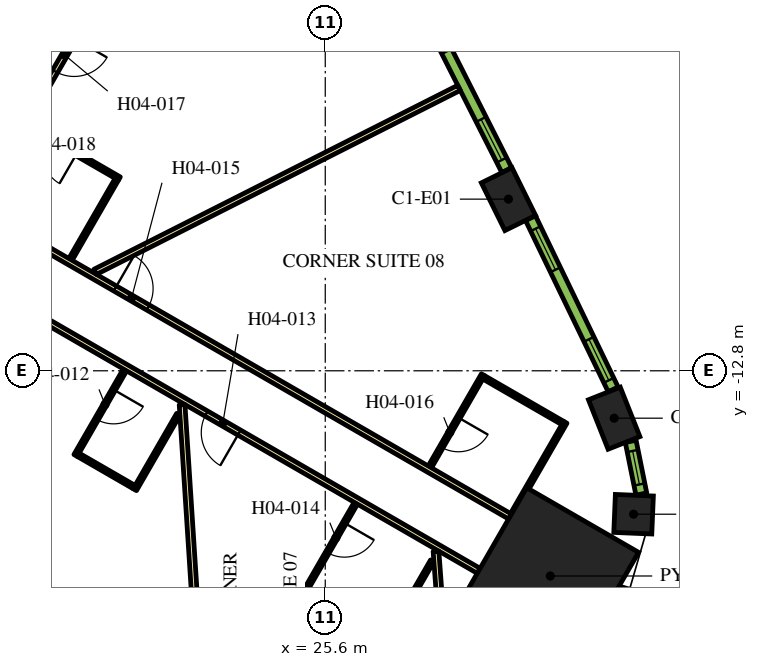
"""IFC4 building model, lengths in metres.
Left out: names, types, materials, properties, quantities, classifications, styles, units other than length and angle.
Written with IfcOpenShell. Run it as: python <this file> out.ifc"""

import sys

from ifc_helpers import new_model, si_unit, direction, frame, frame_2d, origin, origin_2d, place, context, subcontext, project, spatial, rectangle, extrude, element, fill, save


model = new_model("IFC4")
c1 = context("Model", 3, precision=1e-05, world=origin(), true_north=direction((0.0, 1.0)))
c2 = subcontext(c1, "Body", "Model", "MODEL_VIEW")
j1 = project(units=[si_unit("LENGTHUNIT", "METRE"), si_unit("PLANEANGLEUNIT", "RADIAN")], contexts=[c1])
p1 = place(None, origin())
s1 = spatial("IfcSite", under=j1, at=p1, CompositionType="ELEMENT")
p2 = place(p1, origin())
s2 = spatial("IfcBuilding", under=s1, at=p2, CompositionType="ELEMENT")
p3 = place(p2, frame((0.0, 0.0, 70.5)))
s3 = spatial("IfcBuildingStorey", under=s2, at=p3, CompositionType="ELEMENT", Elevation=70.5)
p4 = place(p3, frame((31.522, -18.199, 0.0), z_axis=(0.0, 0.0, 1.0), x_axis=(0.866025403784, -0.5, 0.0)))
e1 = element("IfcColumn", 1, at=p4, inside=s3, PredefinedType="COLUMN", context=c2, shape_type="SweptSolid", body=[
    extrude(rectangle(XDim=3.4, YDim=3.4, at=origin_2d()), origin(), (0.0, 0.0, 1.0), 3.9),
])
p5 = place(p3, frame((33.713, -16.574, 0.0), z_axis=(0.0, 0.0, 1.0), x_axis=(0.041582693819, 0.999135065732, 0.0)))
e2 = element("IfcColumn", 2, at=p5, inside=s3, PredefinedType="COLUMN", context=c2, shape_type="SweptSolid", body=[
    extrude(rectangle(XDim=1.0, YDim=1.0, at=origin_2d()), origin(), (0.0, 0.0, 1.0), 3.9),
])
for number, where, z_axis, x_axis in (
    (3, (33.203, -14.047, 0.0), (0.0, 0.0, 1.0), (-0.369, 0.929, 0.0)),
    (4, (30.421, -8.284, 0.0), (0.0, 0.0, 1.0), (-0.443, 0.897, 0.0)),
):
    element("IfcColumn", number, at=place(p3, frame(where, z_axis=z_axis, x_axis=x_axis)), inside=s3, PredefinedType="COLUMN", context=c2, shape_type="SweptSolid", body=[
        extrude(rectangle(XDim=1.4, YDim=0.9, at=origin_2d()), origin(), (0.0, 0.0, 1.0), 3.9),
    ])
p6 = place(p3, frame((16.412, -8.523, 0.0), z_axis=(0.0, 0.0, 1.0), x_axis=(0.866022197818, -0.500005552856, 0.0)))
e5 = element("IfcWall", 5, at=p6, inside=s3, PredefinedType="PARTITIONING", context=c2, shape_type="SweptSolid", body=[
    extrude(rectangle(XDim=16.224, YDim=0.15, at=frame_2d((8.112, 0.0))), origin(), (0.0, 0.0, 1.0), 2.75),
])
p7 = place(p6, frame((4.223, 0.0, 0.0)))
e6 = element("IfcOpeningElement", 6, at=p7, cuts=e5, PredefinedType="OPENING", context=c2, shape_type="SweptSolid", body=[
    extrude(rectangle(XDim=1.0, YDim=2.1, at=frame_2d((0.5, 1.05))), frame((0.0, 0.085, 0.0), z_axis=(0.0, -1.0, 0.0), x_axis=(1.0, 0.0, 0.0)), (0.0, 0.0, 1.0), 0.17),
])
p8 = place(p3, frame((19.081, -3.9, 0.0), z_axis=(0.0, 0.0, 1.0), x_axis=(-0.499974327079, -0.866040225545, 0.0)))
e7 = element("IfcWall", 7, at=p8, inside=s3, PredefinedType="PARTITIONING", context=c2, shape_type="SweptSolid", body=[
    extrude(rectangle(XDim=5.258, YDim=0.15, at=frame_2d((2.629, 0.0))), origin(), (0.0, 0.0, 1.0), 2.75),
])
p9 = place(p8, frame((0.18, 0.0, 0.0)))
e8 = element("IfcOpeningElement", 8, at=p9, cuts=e7, PredefinedType="OPENING", context=c2, shape_type="SweptSolid", body=[
    extrude(rectangle(XDim=1.0, YDim=2.1, at=frame_2d((0.5, 1.05))), frame((0.0, 0.085, 0.0), z_axis=(0.0, -1.0, 0.0), x_axis=(1.0, 0.0, 0.0)), (0.0, 0.0, 1.0), 0.17),
])
p10 = place(p3, frame((29.638, -18.064, 0.0), z_axis=(0.0, 0.0, 1.0), x_axis=(-0.866026175601, 0.499998663172, 0.0)))
e9 = element("IfcWall", 9, at=p10, inside=s3, PredefinedType="PARTITIONING", context=c2, shape_type="SweptSolid", body=[
    extrude(rectangle(XDim=16.144, YDim=0.15, at=frame_2d((8.072, 0.0))), origin(), (0.0, 0.0, 1.0), 2.75),
])
p11 = place(p10, frame((14.714, 0.0, 0.0)))
e10 = element("IfcOpeningElement", 10, at=p11, cuts=e9, PredefinedType="OPENING", context=c2, shape_type="SweptSolid", body=[
    extrude(rectangle(XDim=1.0, YDim=2.1, at=frame_2d((0.5, 1.05))), frame((0.0, 0.085, 0.0), z_axis=(0.0, -1.0, 0.0), x_axis=(1.0, 0.0, 0.0)), (0.0, 0.0, 1.0), 0.17),
])
p12 = place(p10, frame((7.275, 0.0, 0.0)))
e11 = element("IfcOpeningElement", 11, at=p12, cuts=e9, PredefinedType="OPENING", context=c2, shape_type="SweptSolid", body=[
    extrude(rectangle(XDim=1.0, YDim=2.1, at=frame_2d((0.5, 1.05))), frame((0.0, 0.085, 0.0), z_axis=(0.0, -1.0, 0.0), x_axis=(1.0, 0.0, 0.0)), (0.0, 0.0, 1.0), 0.17),
])
p13 = place(p3, frame((29.12, -5.356, 0.0), z_axis=(0.0, 0.0, 1.0), x_axis=(-0.892401965553, -0.451241323327, 0.0)))
e12 = element("IfcWall", 12, at=p13, inside=s3, PredefinedType="PARTITIONING", context=c2, shape_type="SweptSolid", body=[
    extrude(rectangle(XDim=10.729, YDim=0.15, at=frame_2d((5.364, 0.0))), origin(), (0.0, 0.0, 1.0), 2.75),
])
p14 = place(p3, frame((22.355, -21.754, 0.0), z_axis=(0.0, 0.0, 1.0), x_axis=(-0.064639533143, 0.997908678565, 0.0)))
e13 = element("IfcWall", 13, at=p14, inside=s3, PredefinedType="PARTITIONING", context=c2, shape_type="SweptSolid", body=[
    extrude(rectangle(XDim=8.079, YDim=0.15, at=frame_2d((4.04, 0.0))), origin(), (0.0, 0.0, 1.0), 2.75),
])
p15 = place(p3, frame((28.79, -21.273, 0.0), z_axis=(0.0, 0.0, 1.0), x_axis=(-0.07382592098, 0.997271143366, 0.0)))
e14 = element("IfcWall", 14, at=p15, inside=s3, PredefinedType="PARTITIONING", context=c2, shape_type="SweptSolid", body=[
    extrude(rectangle(XDim=3.734, YDim=0.15, at=frame_2d((1.867, 0.0))), origin(), (0.0, 0.0, 1.0), 2.75),
])
p16 = place(p3, frame((20.33, -12.777, 0.0), z_axis=(0.0, 0.0, 1.0), x_axis=(-0.500006934395, -0.866021400173, 0.0)))
e15 = element("IfcWall", 15, at=p16, inside=s3, PredefinedType="PARTITIONING", context=c2, shape_type="SweptSolid", body=[
    extrude(rectangle(XDim=2.6, YDim=0.1, at=frame_2d((1.3, 0.0))), origin(), (0.0, 0.0, 1.0), 2.75),
])
p17 = place(p16, frame((0.6, 0.0, 0.0)))
e16 = element("IfcOpeningElement", 16, at=p17, cuts=e15, PredefinedType="OPENING", context=c2, shape_type="SweptSolid", body=[
    extrude(rectangle(XDim=0.9, YDim=2.1, at=frame_2d((0.45, 1.05))), frame((0.0, 0.06, 0.0), z_axis=(0.0, -1.0, 0.0), x_axis=(1.0, 0.0, 0.0)), (0.0, 0.0, 1.0), 0.12),
])
p18 = place(p3, frame((19.098, -15.01, 0.0), z_axis=(0.0, 0.0, 1.0), x_axis=(0.86605165483, -0.499954529098, 0.0)))
e17 = element("IfcWall", 17, at=p18, inside=s3, PredefinedType="PARTITIONING", context=c2, shape_type="SweptSolid", body=[
    extrude(rectangle(XDim=1.7, YDim=0.1, at=frame_2d((0.85, 0.0))), origin(), (0.0, 0.0, 1.0), 2.75),
])
p19 = place(p3, frame((21.734, -13.945, 0.0), z_axis=(0.0, 0.0, 1.0), x_axis=(-0.500014693593, -0.866016920268, 0.0)))
e18 = element("IfcWall", 18, at=p19, inside=s3, PredefinedType="PARTITIONING", context=c2, shape_type="SweptSolid", body=[
    extrude(rectangle(XDim=2.29, YDim=0.1, at=frame_2d((1.145, 0.0))), origin(), (0.0, 0.0, 1.0), 2.75),
])
p20 = place(p3, frame((26.405, -16.284, 0.0), z_axis=(0.0, 0.0, 1.0), x_axis=(-0.49998411664, -0.866034573852, 0.0)))
e19 = element("IfcWall", 19, at=p20, inside=s3, PredefinedType="PARTITIONING", context=c2, shape_type="SweptSolid", body=[
    extrude(rectangle(XDim=2.8, YDim=0.1, at=frame_2d((1.4, 0.0))), origin(), (0.0, 0.0, 1.0), 2.75),
])
p21 = place(p20, frame((0.6, 0.0, 0.0)))
e20 = element("IfcOpeningElement", 20, at=p21, cuts=e19, PredefinedType="OPENING", context=c2, shape_type="SweptSolid", body=[
    extrude(rectangle(XDim=0.9, YDim=2.1, at=frame_2d((0.45, 1.05))), frame((0.0, 0.06, 0.0), z_axis=(0.0, -1.0, 0.0), x_axis=(1.0, 0.0, 0.0)), (0.0, 0.0, 1.0), 0.12),
])
p22 = place(p3, frame((28.415, -17.802, 0.0), z_axis=(0.0, 0.0, 1.0), x_axis=(-0.499945955465, -0.866056604163, 0.0)))
e21 = element("IfcWall", 21, at=p22, inside=s3, PredefinedType="PARTITIONING", context=c2, shape_type="SweptSolid", body=[
    extrude(rectangle(XDim=2.49, YDim=0.1, at=frame_2d((1.245, 0.0))), origin(), (0.0, 0.0, 1.0), 2.75),
])
p23 = place(p3, frame((29.752, -12.905, 0.0), z_axis=(0.0, 0.0, 1.0), x_axis=(-0.500049511043, -0.865996816683, 0.0)))
e22 = element("IfcWall", 22, at=p23, inside=s3, PredefinedType="PARTITIONING", context=c2, shape_type="SweptSolid", body=[
    extrude(rectangle(XDim=2.8, YDim=0.1, at=frame_2d((1.4, 0.0))), origin(), (0.0, 0.0, 1.0), 2.75),
])
p24 = place(p23, frame((1.3, 0.0, 0.0)))
e23 = element("IfcOpeningElement", 23, at=p24, cuts=e22, PredefinedType="OPENING", context=c2, shape_type="SweptSolid", body=[
    extrude(rectangle(XDim=0.9, YDim=2.1, at=frame_2d((0.45, 1.05))), frame((0.0, 0.06, 0.0), z_axis=(0.0, -1.0, 0.0), x_axis=(1.0, 0.0, 0.0)), (0.0, 0.0, 1.0), 0.12),
])
p25 = place(p3, frame((29.771, -12.973, 0.0), z_axis=(0.0, 0.0, 1.0), x_axis=(0.865980596518, -0.500077600433, 0.0)))
e24 = element("IfcWall", 24, at=p25, inside=s3, PredefinedType="PARTITIONING", context=c2, shape_type="SweptSolid", body=[
    extrude(rectangle(XDim=2.4, YDim=0.1, at=frame_2d((1.2, 0.0))), origin(), (0.0, 0.0, 1.0), 2.75),
])
p26 = place(p3, frame((30.518, -16.58, 0.0), z_axis=(0.0, 0.0, 1.0), x_axis=(0.49998411664, 0.866034573852, 0.0)))
e25 = element("IfcWall", 25, at=p26, inside=s3, PredefinedType="PARTITIONING", context=c2, shape_type="SweptSolid", body=[
    extrude(rectangle(XDim=2.8, YDim=0.1, at=frame_2d((1.4, 0.0))), origin(), (0.0, 0.0, 1.0), 2.75),
])
p27 = place(p3, frame((20.182, -7.743, 0.0), z_axis=(0.0, 0.0, 1.0), x_axis=(-0.866034573852, 0.49998411664, 0.0)))
e26 = element("IfcWall", 26, at=p27, inside=s3, PredefinedType="PARTITIONING", context=c2, shape_type="SweptSolid", body=[
    extrude(rectangle(XDim=2.8, YDim=0.1, at=frame_2d((1.4, 0.0))), origin(), (0.0, 0.0, 1.0), 2.75),
])
p28 = place(p27, frame((1.3, 0.0, 0.0)))
e27 = element("IfcOpeningElement", 27, at=p28, cuts=e26, PredefinedType="OPENING", context=c2, shape_type="SweptSolid", body=[
    extrude(rectangle(XDim=0.9, YDim=2.1, at=frame_2d((0.45, 1.05))), frame((0.0, 0.06, 0.0), z_axis=(0.0, -1.0, 0.0), x_axis=(1.0, 0.0, 0.0)), (0.0, 0.0, 1.0), 0.12),
])
p29 = place(p3, frame((20.109, -7.771, 0.0), z_axis=(0.0, 0.0, 1.0), x_axis=(-0.500077573772, -0.865980611914, 0.0)))
e28 = element("IfcWall", 28, at=p29, inside=s3, PredefinedType="PARTITIONING", context=c2, shape_type="SweptSolid", body=[
    extrude(rectangle(XDim=2.42, YDim=0.1, at=frame_2d((1.21, 0.0))), origin(), (0.0, 0.0, 1.0), 2.75),
])
p30 = place(p3, frame((33.257, -19.241, 0.0), z_axis=(0.0, 0.0, 1.0), x_axis=(0.278981320915, 0.960296528464, 0.0)))
e29 = element("IfcWall", 29, at=p30, inside=s3, PredefinedType="SOLIDWALL", context=c2, shape_type="SweptSolid", body=[
    extrude(rectangle(XDim=0.764, YDim=0.29, at=frame_2d((0.382, 0.0))), origin(), (0.0, 0.0, 1.0), 3.65),
])
p31 = place(p3, frame((33.917, -16.044, 0.0), z_axis=(0.0, 0.0, 1.0), x_axis=(-0.198106888228, 0.980180422594, 0.0)))
e30 = element("IfcWall", 30, at=p31, inside=s3, PredefinedType="SOLIDWALL", context=c2, shape_type="SweptSolid", body=[
    extrude(rectangle(XDim=1.415, YDim=0.29, at=frame_2d((0.708, 0.0))), origin(), (0.0, 0.0, 1.0), 3.65),
])
p32 = place(p31, frame((0.257, 0.0, 0.9)))
e31 = element("IfcOpeningElement", 31, at=p32, cuts=e30, PredefinedType="OPENING", context=c2, shape_type="SweptSolid", body=[
    extrude(rectangle(XDim=0.9, YDim=2.15, at=frame_2d((0.45, 1.075))), frame((0.0, 0.155, 0.0), z_axis=(0.0, -1.0, 0.0), x_axis=(1.0, 0.0, 0.0)), (0.0, 0.0, 1.0), 0.31),
])
p33 = place(p3, frame((33.176, -13.29, 0.0), z_axis=(0.0, 0.0, 1.0), x_axis=(-0.434664499056, 0.900592456808, 0.0)))
e32 = element("IfcWall", 32, at=p33, inside=s3, PredefinedType="SOLIDWALL", context=c2, shape_type="SweptSolid", body=[
    extrude(rectangle(XDim=5.006, YDim=0.29, at=frame_2d((2.503, 0.0))), origin(), (0.0, 0.0, 1.0), 3.65),
])
p34 = place(p33, frame((0.265, 0.0, 0.9)))
e33 = element("IfcOpeningElement", 33, at=p34, cuts=e32, PredefinedType="OPENING", context=c2, shape_type="SweptSolid", body=[
    extrude(rectangle(XDim=1.2, YDim=2.15, at=frame_2d((0.6, 1.075))), frame((0.0, 0.155, 0.0), z_axis=(0.0, -1.0, 0.0), x_axis=(1.0, 0.0, 0.0)), (0.0, 0.0, 1.0), 0.31),
])
p35 = place(p33, frame((3.496, 0.0, 0.9)))
e34 = element("IfcOpeningElement", 34, at=p35, cuts=e32, PredefinedType="OPENING", context=c2, shape_type="SweptSolid", body=[
    extrude(rectangle(XDim=1.2, YDim=2.15, at=frame_2d((0.6, 1.075))), frame((0.0, 0.155, 0.0), z_axis=(0.0, -1.0, 0.0), x_axis=(1.0, 0.0, 0.0)), (0.0, 0.0, 1.0), 0.31),
])
p36 = place(p3, frame((30.377, -7.521, 0.0), z_axis=(0.0, 0.0, 1.0), x_axis=(-0.451233929645, 0.892405704115, 0.0)))
e35 = element("IfcWall", 35, at=p36, inside=s3, PredefinedType="SOLIDWALL", context=c2, shape_type="SweptSolid", body=[
    extrude(rectangle(XDim=4.998, YDim=0.29, at=frame_2d((2.499, 0.0))), origin(), (0.0, 0.0, 1.0), 3.65),
])
p37 = place(p36, frame((0.297, 0.0, 0.9)))
e36 = element("IfcOpeningElement", 36, at=p37, cuts=e35, PredefinedType="OPENING", context=c2, shape_type="SweptSolid", body=[
    extrude(rectangle(XDim=1.2, YDim=2.15, at=frame_2d((0.6, 1.075))), frame((0.0, 0.155, 0.0), z_axis=(0.0, -1.0, 0.0), x_axis=(1.0, 0.0, 0.0)), (0.0, 0.0, 1.0), 0.31),
])
p38 = place(p36, frame((3.501, 0.0, 0.9)))
e37 = element("IfcOpeningElement", 37, at=p38, cuts=e35, PredefinedType="OPENING", context=c2, shape_type="SweptSolid", body=[
    extrude(rectangle(XDim=1.2, YDim=2.15, at=frame_2d((0.6, 1.075))), frame((0.0, 0.155, 0.0), z_axis=(0.0, -1.0, 0.0), x_axis=(1.0, 0.0, 0.0)), (0.0, 0.0, 1.0), 0.31),
])
p39 = place(p17, origin())
e38 = element("IfcDoor", 38, at=p39, inside=s3, OperationType="SINGLE_SWING_RIGHT", PredefinedType="DOOR", context=c2, shape_type="SweptSolid", body=[
    extrude(rectangle(XDim=0.9, YDim=2.1, at=frame_2d((0.45, 1.05))), frame((0.0, 0.025, 0.0), z_axis=(0.0, -1.0, 0.0), x_axis=(1.0, 0.0, 0.0)), (0.0, 0.0, 1.0), 0.05),
])
fill(e16, e38)
p40 = place(p12, origin())
e39 = element("IfcDoor", 39, at=p40, inside=s3, OperationType="SINGLE_SWING_RIGHT", PredefinedType="DOOR", context=c2, shape_type="SweptSolid", body=[
    extrude(rectangle(XDim=1.0, YDim=2.1, at=frame_2d((0.5, 1.05))), frame((0.0, 0.025, 0.0), z_axis=(0.0, -1.0, 0.0), x_axis=(1.0, 0.0, 0.0)), (0.0, 0.0, 1.0), 0.05),
])
fill(e11, e39)
p41 = place(p21, origin())
e40 = element("IfcDoor", 40, at=p41, inside=s3, OperationType="SINGLE_SWING_LEFT", PredefinedType="DOOR", context=c2, shape_type="SweptSolid", body=[
    extrude(rectangle(XDim=0.9, YDim=2.1, at=frame_2d((0.45, 1.05))), frame((0.0, 0.025, 0.0), z_axis=(0.0, -1.0, 0.0), x_axis=(1.0, 0.0, 0.0)), (0.0, 0.0, 1.0), 0.05),
])
fill(e20, e40)
p42 = place(p7, origin())
e41 = element("IfcDoor", 41, at=p42, inside=s3, OperationType="SINGLE_SWING_LEFT", PredefinedType="DOOR", context=c2, shape_type="SweptSolid", body=[
    extrude(rectangle(XDim=1.0, YDim=2.1, at=frame_2d((0.5, 1.05))), frame((0.0, 0.025, 0.0), z_axis=(0.0, -1.0, 0.0), x_axis=(1.0, 0.0, 0.0)), (0.0, 0.0, 1.0), 0.05),
])
fill(e6, e41)
p43 = place(p24, origin())
e42 = element("IfcDoor", 42, at=p43, inside=s3, OperationType="SINGLE_SWING_LEFT", PredefinedType="DOOR", context=c2, shape_type="SweptSolid", body=[
    extrude(rectangle(XDim=0.9, YDim=2.1, at=frame_2d((0.45, 1.05))), frame((0.0, 0.025, 0.0), z_axis=(0.0, -1.0, 0.0), x_axis=(1.0, 0.0, 0.0)), (0.0, 0.0, 1.0), 0.05),
])
fill(e23, e42)
p44 = place(p9, origin())
e43 = element("IfcDoor", 43, at=p44, inside=s3, OperationType="SINGLE_SWING_LEFT", PredefinedType="DOOR", context=c2, shape_type="SweptSolid", body=[
    extrude(rectangle(XDim=1.0, YDim=2.1, at=frame_2d((0.5, 1.05))), frame((0.0, 0.025, 0.0), z_axis=(0.0, -1.0, 0.0), x_axis=(1.0, 0.0, 0.0)), (0.0, 0.0, 1.0), 0.05),
])
fill(e8, e43)
p45 = place(p28, origin())
e44 = element("IfcDoor", 44, at=p45, inside=s3, OperationType="SINGLE_SWING_RIGHT", PredefinedType="DOOR", context=c2, shape_type="SweptSolid", body=[
    extrude(rectangle(XDim=0.9, YDim=2.1, at=frame_2d((0.45, 1.05))), frame((0.0, 0.025, 0.0), z_axis=(0.0, -1.0, 0.0), x_axis=(1.0, 0.0, 0.0)), (0.0, 0.0, 1.0), 0.05),
])
fill(e27, e44)
p46 = place(p32, origin())
e45 = element("IfcWindow", 45, at=p46, inside=s3, PartitioningType="SINGLE_PANEL", PredefinedType="WINDOW", context=c2, shape_type="SweptSolid", body=[
    extrude(rectangle(XDim=0.9, YDim=2.15, at=frame_2d((0.45, 1.075))), frame((0.0, 0.015, 0.0), z_axis=(0.0, -1.0, 0.0), x_axis=(1.0, 0.0, 0.0)), (0.0, 0.0, 1.0), 0.06),
])
fill(e31, e45)
p47 = place(p34, origin())
e46 = element("IfcWindow", 46, at=p47, inside=s3, PartitioningType="DOUBLE_PANEL_VERTICAL", PredefinedType="WINDOW", context=c2, shape_type="SweptSolid", body=[
    extrude(rectangle(XDim=1.2, YDim=2.15, at=frame_2d((0.6, 1.075))), frame((0.0, 0.015, 0.0), z_axis=(0.0, -1.0, 0.0), x_axis=(1.0, 0.0, 0.0)), (0.0, 0.0, 1.0), 0.06),
])
fill(e33, e46)
p48 = place(p35, origin())
e47 = element("IfcWindow", 47, at=p48, inside=s3, PartitioningType="DOUBLE_PANEL_VERTICAL", PredefinedType="WINDOW", context=c2, shape_type="SweptSolid", body=[
    extrude(rectangle(XDim=1.2, YDim=2.15, at=frame_2d((0.6, 1.075))), frame((0.0, 0.015, 0.0), z_axis=(0.0, -1.0, 0.0), x_axis=(1.0, 0.0, 0.0)), (0.0, 0.0, 1.0), 0.06),
])
fill(e34, e47)
p49 = place(p37, origin())
e48 = element("IfcWindow", 48, at=p49, inside=s3, PartitioningType="DOUBLE_PANEL_VERTICAL", PredefinedType="WINDOW", context=c2, shape_type="SweptSolid", body=[
    extrude(rectangle(XDim=1.2, YDim=2.15, at=frame_2d((0.6, 1.075))), frame((0.0, 0.015, 0.0), z_axis=(0.0, -1.0, 0.0), x_axis=(1.0, 0.0, 0.0)), (0.0, 0.0, 1.0), 0.06),
])
fill(e36, e48)
save(model, sys.argv[1])
